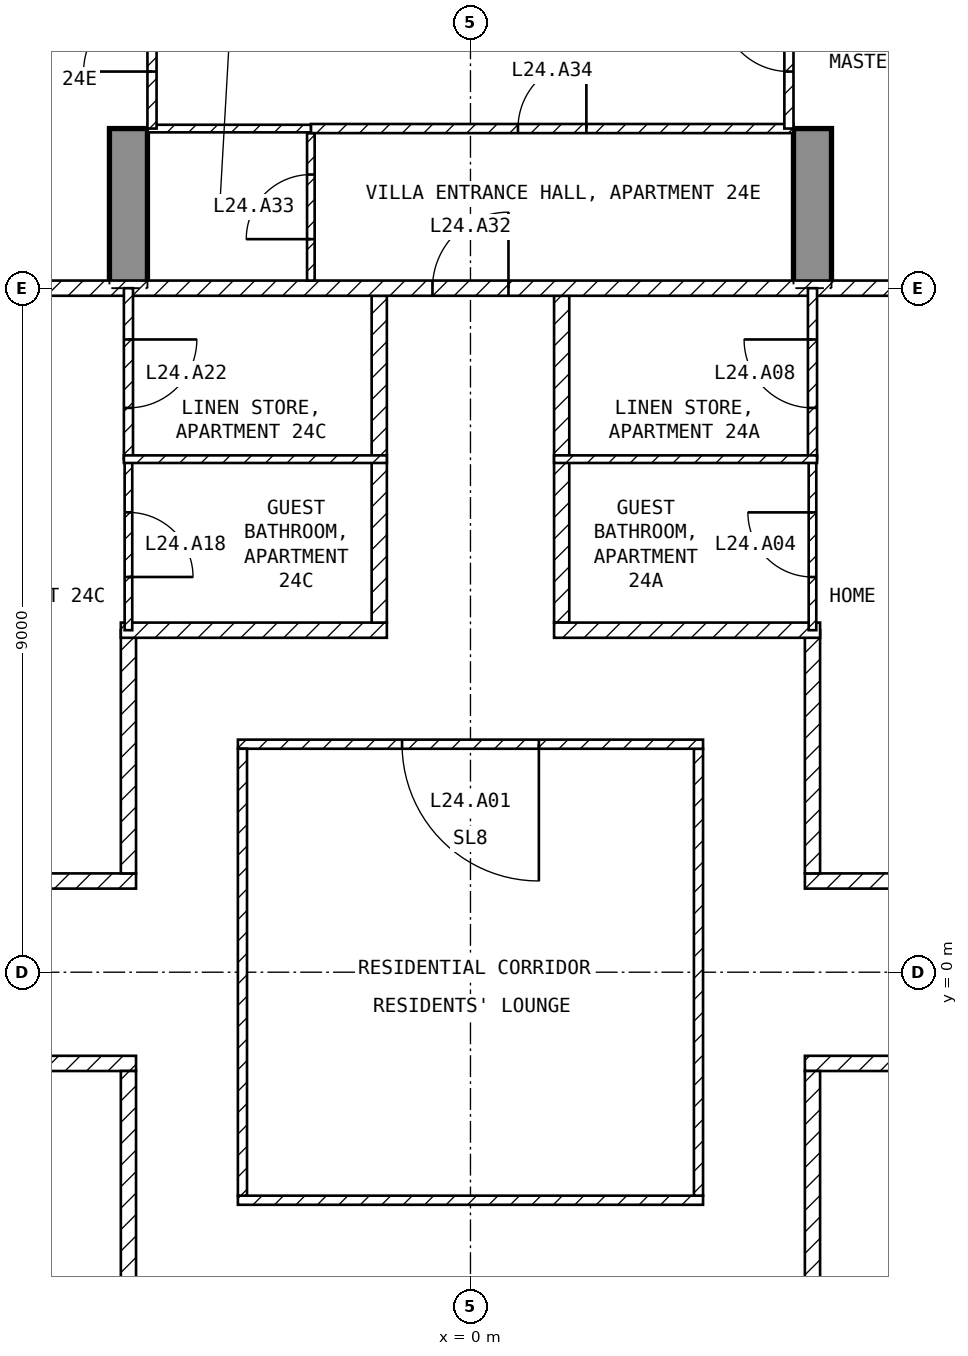
"""IFC4 building model, lengths in metres.
Left out: names, types, materials, properties, quantities, classifications, styles, units other than length and angle.
Written with IfcOpenShell. Run it as: python <this file> out.ifc"""

import sys

from ifc_helpers import new_model, si_unit, direction, frame, frame_2d, origin, place, context, subcontext, project, spatial, polyline, rectangle, outline, extrude, element, fill, save


model = new_model("IFC4")
c1 = context("Model", 3, precision=1e-05, world=origin(), true_north=direction((0.0, 1.0)))
c2 = subcontext(c1, "Body", "Model", "MODEL_VIEW")
j1 = project(units=[si_unit("LENGTHUNIT", "METRE"), si_unit("PLANEANGLEUNIT", "RADIAN")], contexts=[c1])
p1 = place(None, origin())
s1 = spatial("IfcSite", under=j1, at=p1, CompositionType="ELEMENT")
p2 = place(p1, origin())
s2 = spatial("IfcBuilding", under=s1, at=p2, CompositionType="ELEMENT")
p3 = place(p2, frame((0.0, 0.0, 105.9)))
s3 = spatial("IfcBuildingStorey", under=s2, at=p3, CompositionType="ELEMENT", Elevation=105.9)
for number, where, z_axis, x_axis in (
    (1, (-4.75, 9.0, -0.25), (1.0, 0.0, 0.0), (0.0, 1.0, 0.0)),
    (2, (4.25, 9.0, -0.25), (1.0, 0.0, 0.0), (0.0, 1.0, 0.0)),
):
    element("IfcWall", number, at=place(p3, frame(where, z_axis=z_axis, x_axis=x_axis)), inside=s3, PredefinedType="SHEAR", context=c2, shape_type="SweptSolid", body=[
        extrude(outline(polyline([(0.0, 0.0), (2.1, 0.0), (2.1, 2.65), (4.5, 2.65), (4.5, 0.0), (9.9, 0.0), (9.9, 2.65), (12.3, 2.65), (12.3, 0.0), (16.55, 0.0), (16.55, 3.5), (0.0, 3.5), (0.0, 0.0)])), origin(), (0.0, 0.0, 1.0), 0.5),
    ])
p4 = place(p3, frame((-3.06, -3.0, 0.0), z_axis=(0.0, 0.0, 1.0), x_axis=(1.0, 0.0, 0.0)))
e3 = element("IfcWall", 3, at=p4, inside=s3, PredefinedType="PARTITIONING", context=c2, shape_type="SweptSolid", body=[
    extrude(rectangle(XDim=6.12, YDim=0.12, at=frame_2d((3.06, 0.0))), origin(), (0.0, 0.0, 1.0), 3.25),
])
p5 = place(p3, frame((3.0, -2.94, 0.0), z_axis=(0.0, 0.0, 1.0), x_axis=(0.0, 1.0, 0.0)))
e4 = element("IfcWall", 4, at=p5, inside=s3, PredefinedType="PARTITIONING", context=c2, shape_type="SweptSolid", body=[
    extrude(rectangle(XDim=5.88, YDim=0.12, at=frame_2d((2.94, 0.0))), origin(), (0.0, 0.0, 1.0), 3.25),
])
p6 = place(p3, frame((3.06, 3.0, 0.0), z_axis=(0.0, 0.0, 1.0), x_axis=(-1.0, 0.0, 0.0)))
e5 = element("IfcWall", 5, at=p6, inside=s3, PredefinedType="PARTITIONING", context=c2, shape_type="SweptSolid", body=[
    extrude(rectangle(XDim=6.12, YDim=0.12, at=frame_2d((3.06, 0.0))), origin(), (0.0, 0.0, 1.0), 3.25),
])
p7 = place(p6, frame((2.16, 0.0, 0.0)))
e6 = element("IfcOpeningElement", 6, at=p7, cuts=e5, PredefinedType="OPENING", context=c2, shape_type="SweptSolid", body=[
    extrude(rectangle(XDim=1.8, YDim=2.1, at=frame_2d((0.9, 1.05))), frame((0.0, 0.07, 0.0), z_axis=(0.0, -1.0, 0.0), x_axis=(1.0, 0.0, 0.0)), (0.0, 0.0, 1.0), 0.14),
])
p8 = place(p3, frame((-3.0, 2.94, 0.0), z_axis=(0.0, 0.0, 1.0), x_axis=(0.0, -1.0, 0.0)))
e7 = element("IfcWall", 7, at=p8, inside=s3, PredefinedType="PARTITIONING", context=c2, shape_type="SweptSolid", body=[
    extrude(rectangle(XDim=5.88, YDim=0.12, at=frame_2d((2.94, 0.0))), origin(), (0.0, 0.0, 1.0), 3.25),
])
p9 = place(p3, frame((4.4, 1.2, 0.0), z_axis=(0.0, 0.0, 1.0), x_axis=(1.0, 0.0, 0.0)))
e8 = element("IfcWall", 8, at=p9, inside=s3, PredefinedType="PARTITIONING", context=c2, shape_type="SweptSolid", body=[
    extrude(rectangle(XDim=17.2, YDim=0.2, at=frame_2d((8.6, 0.0))), origin(), (0.0, 0.0, 1.0), 3.25),
])
p10 = place(p9, frame((5.9, 0.0, 0.0)))
e9 = element("IfcOpeningElement", 9, at=p10, cuts=e8, PredefinedType="OPENING", context=c2, shape_type="SweptSolid", body=[
    extrude(rectangle(XDim=1.0, YDim=2.1, at=frame_2d((0.5, 1.05))), frame((0.0, 0.11, 0.0), z_axis=(0.0, -1.0, 0.0), x_axis=(1.0, 0.0, 0.0)), (0.0, 0.0, 1.0), 0.22),
])
p11 = place(p3, frame((4.5, 4.5, 0.0), z_axis=(0.0, 0.0, 1.0), x_axis=(0.0, -1.0, 0.0)))
e10 = element("IfcWall", 10, at=p11, inside=s3, PredefinedType="PARTITIONING", context=c2, shape_type="SweptSolid", body=[
    extrude(rectangle(XDim=3.2, YDim=0.2, at=frame_2d((1.6, 0.0))), origin(), (0.0, 0.0, 1.0), 3.25),
])
p12 = place(p3, frame((1.2, 8.9, 0.0), z_axis=(0.0, 0.0, 1.0), x_axis=(0.0, -1.0, 0.0)))
e11 = element("IfcWall", 11, at=p12, inside=s3, PredefinedType="PARTITIONING", context=c2, shape_type="SweptSolid", body=[
    extrude(rectangle(XDim=4.3, YDim=0.2, at=frame_2d((2.15, 0.0))), origin(), (0.0, 0.0, 1.0), 3.25),
])
p13 = place(p3, frame((1.1, 4.5, 0.0), z_axis=(0.0, 0.0, 1.0), x_axis=(1.0, 0.0, 0.0)))
e12 = element("IfcWall", 12, at=p13, inside=s3, PredefinedType="PARTITIONING", context=c2, shape_type="SweptSolid", body=[
    extrude(rectangle(XDim=3.5, YDim=0.2, at=frame_2d((1.75, 0.0))), origin(), (0.0, 0.0, 1.0), 3.25),
])
p14 = place(p3, frame((21.6, -1.2, 0.0), z_axis=(0.0, 0.0, 1.0), x_axis=(-1.0, 0.0, 0.0)))
e13 = element("IfcWall", 13, at=p14, inside=s3, PredefinedType="PARTITIONING", context=c2, shape_type="SweptSolid", body=[
    extrude(rectangle(XDim=17.2, YDim=0.2, at=frame_2d((8.6, 0.0))), origin(), (0.0, 0.0, 1.0), 3.25),
])
p15 = place(p14, frame((3.85, 0.0, 0.0)))
e14 = element("IfcOpeningElement", 14, at=p15, cuts=e13, PredefinedType="OPENING", context=c2, shape_type="SweptSolid", body=[
    extrude(rectangle(XDim=1.0, YDim=2.1, at=frame_2d((0.5, 1.05))), frame((0.0, 0.11, 0.0), z_axis=(0.0, -1.0, 0.0), x_axis=(1.0, 0.0, 0.0)), (0.0, 0.0, 1.0), 0.22),
])
p16 = place(p3, frame((4.5, -1.3, 0.0), z_axis=(0.0, 0.0, 1.0), x_axis=(0.0, -1.0, 0.0)))
e15 = element("IfcWall", 15, at=p16, inside=s3, PredefinedType="PARTITIONING", context=c2, shape_type="SweptSolid", body=[
    extrude(rectangle(XDim=3.2, YDim=0.2, at=frame_2d((1.6, 0.0))), origin(), (0.0, 0.0, 1.0), 3.25),
])
p17 = place(p3, frame((-21.6, 1.2, 0.0), z_axis=(0.0, 0.0, 1.0), x_axis=(1.0, 0.0, 0.0)))
e16 = element("IfcWall", 16, at=p17, inside=s3, PredefinedType="PARTITIONING", context=c2, shape_type="SweptSolid", body=[
    extrude(rectangle(XDim=17.2, YDim=0.2, at=frame_2d((8.6, 0.0))), origin(), (0.0, 0.0, 1.0), 3.25),
])
p18 = place(p17, frame((6.1, 0.0, 0.0)))
e17 = element("IfcOpeningElement", 17, at=p18, cuts=e16, PredefinedType="OPENING", context=c2, shape_type="SweptSolid", body=[
    extrude(rectangle(XDim=1.0, YDim=2.1, at=frame_2d((0.5, 1.05))), frame((0.0, 0.11, 0.0), z_axis=(0.0, -1.0, 0.0), x_axis=(1.0, 0.0, 0.0)), (0.0, 0.0, 1.0), 0.22),
])
p19 = place(p3, frame((-4.5, 1.3, 0.0), z_axis=(0.0, 0.0, 1.0), x_axis=(0.0, 1.0, 0.0)))
e18 = element("IfcWall", 18, at=p19, inside=s3, PredefinedType="PARTITIONING", context=c2, shape_type="SweptSolid", body=[
    extrude(rectangle(XDim=3.2, YDim=0.2, at=frame_2d((1.6, 0.0))), origin(), (0.0, 0.0, 1.0), 3.25),
])
p20 = place(p3, frame((-4.6, 4.5, 0.0), z_axis=(0.0, 0.0, 1.0), x_axis=(1.0, 0.0, 0.0)))
e19 = element("IfcWall", 19, at=p20, inside=s3, PredefinedType="PARTITIONING", context=c2, shape_type="SweptSolid", body=[
    extrude(rectangle(XDim=3.5, YDim=0.2, at=frame_2d((1.75, 0.0))), origin(), (0.0, 0.0, 1.0), 3.25),
])
p21 = place(p3, frame((-1.2, 4.6, 0.0), z_axis=(0.0, 0.0, 1.0), x_axis=(0.0, 1.0, 0.0)))
e20 = element("IfcWall", 20, at=p21, inside=s3, PredefinedType="PARTITIONING", context=c2, shape_type="SweptSolid", body=[
    extrude(rectangle(XDim=4.3, YDim=0.2, at=frame_2d((2.15, 0.0))), origin(), (0.0, 0.0, 1.0), 3.25),
])
p22 = place(p3, frame((-4.4, -1.2, 0.0), z_axis=(0.0, 0.0, 1.0), x_axis=(-1.0, 0.0, 0.0)))
e21 = element("IfcWall", 21, at=p22, inside=s3, PredefinedType="PARTITIONING", context=c2, shape_type="SweptSolid", body=[
    extrude(rectangle(XDim=17.2, YDim=0.2, at=frame_2d((8.6, 0.0))), origin(), (0.0, 0.0, 1.0), 3.25),
])
p23 = place(p22, frame((8.3, 0.0, 0.0)))
e22 = element("IfcOpeningElement", 22, at=p23, cuts=e21, PredefinedType="OPENING", context=c2, shape_type="SweptSolid", body=[
    extrude(rectangle(XDim=1.0, YDim=2.1, at=frame_2d((0.5, 1.05))), frame((0.0, 0.11, 0.0), z_axis=(0.0, -1.0, 0.0), x_axis=(1.0, 0.0, 0.0)), (0.0, 0.0, 1.0), 0.22),
])
p24 = place(p3, frame((-4.5, -4.5, 0.0), z_axis=(0.0, 0.0, 1.0), x_axis=(0.0, 1.0, 0.0)))
e23 = element("IfcWall", 23, at=p24, inside=s3, PredefinedType="PARTITIONING", context=c2, shape_type="SweptSolid", body=[
    extrude(rectangle(XDim=3.2, YDim=0.2, at=frame_2d((1.6, 0.0))), origin(), (0.0, 0.0, 1.0), 3.25),
])
p25 = place(p3, frame((-8.92, 9.0, 0.0), z_axis=(0.0, 0.0, 1.0), x_axis=(1.0, 0.0, 0.0)))
e24 = element("IfcWall", 24, at=p25, inside=s3, PredefinedType="PARTITIONING", context=c2, shape_type="SweptSolid", body=[
    extrude(rectangle(XDim=17.84, YDim=0.2, at=frame_2d((8.92, 0.0))), origin(), (0.0, 0.0, 1.0), 3.25),
])
p26 = place(p25, frame((8.42, 0.0, 0.0)))
e25 = element("IfcOpeningElement", 25, at=p26, cuts=e24, PredefinedType="OPENING", context=c2, shape_type="SweptSolid", body=[
    extrude(rectangle(XDim=1.0, YDim=2.1, at=frame_2d((0.5, 1.05))), frame((0.0, 0.11, 0.0), z_axis=(0.0, -1.0, 0.0), x_axis=(1.0, 0.0, 0.0)), (0.0, 0.0, 1.0), 0.22),
])
p27 = place(p3, frame((4.5, 4.5, 0.0), z_axis=(0.0, 0.0, 1.0), x_axis=(0.0, 1.0, 0.0)))
e26 = element("IfcWall", 26, at=p27, inside=s3, PredefinedType="PARTITIONING", context=c2, shape_type="SweptSolid", body=[
    extrude(rectangle(XDim=2.25, YDim=0.1, at=frame_2d((1.125, 0.0))), origin(), (0.0, 0.0, 1.0), 3.25),
])
p28 = place(p27, frame((0.7, 0.0, 0.0)))
e27 = element("IfcOpeningElement", 27, at=p28, cuts=e26, PredefinedType="OPENING", context=c2, shape_type="SweptSolid", body=[
    extrude(rectangle(XDim=0.85, YDim=2.1, at=frame_2d((0.425, 1.05))), frame((0.0, 0.06, 0.0), z_axis=(0.0, -1.0, 0.0), x_axis=(1.0, 0.0, 0.0)), (0.0, 0.0, 1.0), 0.12),
])
p29 = place(p3, frame((4.5, 6.75, 0.0), z_axis=(0.0, 0.0, 1.0), x_axis=(0.0, 1.0, 0.0)))
e28 = element("IfcWall", 28, at=p29, inside=s3, PredefinedType="PARTITIONING", context=c2, shape_type="SweptSolid", body=[
    extrude(rectangle(XDim=2.25, YDim=0.12, at=frame_2d((1.125, 0.0))), origin(), (0.0, 0.0, 1.0), 3.25),
])
p30 = place(p29, frame((0.675, 0.0, 0.0)))
e29 = element("IfcOpeningElement", 29, at=p30, cuts=e28, PredefinedType="OPENING", context=c2, shape_type="SweptSolid", body=[
    extrude(rectangle(XDim=0.9, YDim=2.1, at=frame_2d((0.45, 1.05))), frame((0.0, 0.07, 0.0), z_axis=(0.0, -1.0, 0.0), x_axis=(1.0, 0.0, 0.0)), (0.0, 0.0, 1.0), 0.14),
])
p31 = place(p3, frame((1.1, 6.75, 0.0), z_axis=(0.0, 0.0, 1.0), x_axis=(1.0, 0.0, 0.0)))
e30 = element("IfcWall", 30, at=p31, inside=s3, PredefinedType="PARTITIONING", context=c2, shape_type="SweptSolid", body=[
    extrude(rectangle(XDim=3.46, YDim=0.1, at=frame_2d((1.73, 0.0))), origin(), (0.0, 0.0, 1.0), 3.25),
])
p32 = place(p3, frame((-4.5, 6.75, 0.0), z_axis=(0.0, 0.0, 1.0), x_axis=(0.0, -1.0, 0.0)))
e31 = element("IfcWall", 31, at=p32, inside=s3, PredefinedType="PARTITIONING", context=c2, shape_type="SweptSolid", body=[
    extrude(rectangle(XDim=2.25, YDim=0.1, at=frame_2d((1.125, 0.0))), origin(), (0.0, 0.0, 1.0), 3.25),
])
p33 = place(p32, frame((0.7, 0.0, 0.0)))
e32 = element("IfcOpeningElement", 32, at=p33, cuts=e31, PredefinedType="OPENING", context=c2, shape_type="SweptSolid", body=[
    extrude(rectangle(XDim=0.85, YDim=2.1, at=frame_2d((0.425, 1.05))), frame((0.0, 0.06, 0.0), z_axis=(0.0, -1.0, 0.0), x_axis=(1.0, 0.0, 0.0)), (0.0, 0.0, 1.0), 0.12),
])
p34 = place(p3, frame((-4.5, 9.0, 0.0), z_axis=(0.0, 0.0, 1.0), x_axis=(0.0, -1.0, 0.0)))
e33 = element("IfcWall", 33, at=p34, inside=s3, PredefinedType="PARTITIONING", context=c2, shape_type="SweptSolid", body=[
    extrude(rectangle(XDim=2.25, YDim=0.12, at=frame_2d((1.125, 0.0))), origin(), (0.0, 0.0, 1.0), 3.25),
])
p35 = place(p34, frame((0.675, 0.0, 0.0)))
e34 = element("IfcOpeningElement", 34, at=p35, cuts=e33, PredefinedType="OPENING", context=c2, shape_type="SweptSolid", body=[
    extrude(rectangle(XDim=0.9, YDim=2.1, at=frame_2d((0.45, 1.05))), frame((0.0, 0.07, 0.0), z_axis=(0.0, -1.0, 0.0), x_axis=(1.0, 0.0, 0.0)), (0.0, 0.0, 1.0), 0.14),
])
p36 = place(p3, frame((-4.56, 6.75, 0.0), z_axis=(0.0, 0.0, 1.0), x_axis=(1.0, 0.0, 0.0)))
e35 = element("IfcWall", 35, at=p36, inside=s3, PredefinedType="PARTITIONING", context=c2, shape_type="SweptSolid", body=[
    extrude(rectangle(XDim=3.46, YDim=0.1, at=frame_2d((1.73, 0.0))), origin(), (0.0, 0.0, 1.0), 3.25),
])
p37 = place(p3, frame((-2.1, 9.1, 0.0), z_axis=(0.0, 0.0, 1.0), x_axis=(0.0, 1.0, 0.0)))
e36 = element("IfcWall", 36, at=p37, inside=s3, PredefinedType="PARTITIONING", context=c2, shape_type="SweptSolid", body=[
    extrude(rectangle(XDim=1.94, YDim=0.1, at=frame_2d((0.97, 0.0))), origin(), (0.0, 0.0, 1.0), 3.25),
])
p38 = place(p37, frame((0.545, 0.0, 0.0)))
e37 = element("IfcOpeningElement", 37, at=p38, cuts=e36, PredefinedType="OPENING", context=c2, shape_type="SweptSolid", body=[
    extrude(rectangle(XDim=0.85, YDim=2.1, at=frame_2d((0.425, 1.05))), frame((0.0, 0.06, 0.0), z_axis=(0.0, -1.0, 0.0), x_axis=(1.0, 0.0, 0.0)), (0.0, 0.0, 1.0), 0.12),
])
p39 = place(p3, frame((-2.1, 11.1, 0.0), z_axis=(0.0, 0.0, 1.0), x_axis=(1.0, 0.0, 0.0)))
e38 = element("IfcWall", 38, at=p39, inside=s3, PredefinedType="PARTITIONING", context=c2, shape_type="SweptSolid", body=[
    extrude(rectangle(XDim=6.35, YDim=0.12, at=frame_2d((3.175, 0.0))), origin(), (0.0, 0.0, 1.0), 3.25),
])
p40 = place(p39, frame((2.725, 0.0, 0.0)))
e39 = element("IfcOpeningElement", 39, at=p40, cuts=e38, PredefinedType="OPENING", context=c2, shape_type="SweptSolid", body=[
    extrude(rectangle(XDim=0.9, YDim=2.1, at=frame_2d((0.45, 1.05))), frame((0.0, 0.07, 0.0), z_axis=(0.0, -1.0, 0.0), x_axis=(1.0, 0.0, 0.0)), (0.0, 0.0, 1.0), 0.14),
])
p41 = place(p3, frame((-4.25, 11.1, 0.0), z_axis=(0.0, 0.0, 1.0), x_axis=(1.0, 0.0, 0.0)))
e40 = element("IfcWall", 40, at=p41, inside=s3, PredefinedType="PARTITIONING", context=c2, shape_type="SweptSolid", body=[
    extrude(rectangle(XDim=2.15, YDim=0.1, at=frame_2d((1.075, 0.0))), origin(), (0.0, 0.0, 1.0), 3.25),
])
p42 = place(p3, frame((4.19, 11.1, 0.0), z_axis=(0.0, 0.0, 1.0), x_axis=(0.0, 1.0, 0.0)))
e41 = element("IfcWall", 41, at=p42, inside=s3, PredefinedType="PARTITIONING", context=c2, shape_type="SweptSolid", body=[
    extrude(rectangle(XDim=2.4, YDim=0.12, at=frame_2d((1.2, 0.0))), origin(), (0.0, 0.0, 1.0), 2.4),
])
p43 = place(p42, frame((0.75, 0.0, 0.0)))
e42 = element("IfcOpeningElement", 42, at=p43, cuts=e41, PredefinedType="OPENING", context=c2, shape_type="SweptSolid", body=[
    extrude(rectangle(XDim=0.9, YDim=2.1, at=frame_2d((0.45, 1.05))), frame((0.0, 0.07, 0.0), z_axis=(0.0, -1.0, 0.0), x_axis=(1.0, 0.0, 0.0)), (0.0, 0.0, 1.0), 0.14),
])
p44 = place(p3, frame((-4.19, 11.1, 0.0), z_axis=(0.0, 0.0, 1.0), x_axis=(0.0, 1.0, 0.0)))
e43 = element("IfcWall", 43, at=p44, inside=s3, PredefinedType="PARTITIONING", context=c2, shape_type="SweptSolid", body=[
    extrude(rectangle(XDim=2.4, YDim=0.12, at=frame_2d((1.2, 0.0))), origin(), (0.0, 0.0, 1.0), 2.4),
])
p45 = place(p44, frame((0.75, 0.0, 0.0)))
e44 = element("IfcOpeningElement", 44, at=p45, cuts=e43, PredefinedType="OPENING", context=c2, shape_type="SweptSolid", body=[
    extrude(rectangle(XDim=0.9, YDim=2.1, at=frame_2d((0.45, 1.05))), frame((0.0, 0.07, 0.0), z_axis=(0.0, -1.0, 0.0), x_axis=(1.0, 0.0, 0.0)), (0.0, 0.0, 1.0), 0.14),
])
p46 = place(p7, origin())
e45 = element("IfcDoor", 45, at=p46, inside=s3, OperationType="SINGLE_SWING_LEFT", PredefinedType="DOOR", context=c2, shape_type="SweptSolid", body=[
    extrude(rectangle(XDim=1.8, YDim=2.1, at=frame_2d((0.9, 1.05))), frame((0.0, 0.025, 0.0), z_axis=(0.0, -1.0, 0.0), x_axis=(1.0, 0.0, 0.0)), (0.0, 0.0, 1.0), 0.05),
])
fill(e6, e45)
p47 = place(p28, origin())
e46 = element("IfcDoor", 46, at=p47, inside=s3, OperationType="SINGLE_SWING_RIGHT", PredefinedType="DOOR", context=c2, shape_type="SweptSolid", body=[
    extrude(rectangle(XDim=0.85, YDim=2.1, at=frame_2d((0.425, 1.05))), frame((0.0, 0.025, 0.0), z_axis=(0.0, -1.0, 0.0), x_axis=(1.0, 0.0, 0.0)), (0.0, 0.0, 1.0), 0.05),
])
fill(e27, e46)
p48 = place(p30, origin())
e47 = element("IfcDoor", 47, at=p48, inside=s3, OperationType="SINGLE_SWING_RIGHT", PredefinedType="DOOR", context=c2, shape_type="SweptSolid", body=[
    extrude(rectangle(XDim=0.9, YDim=2.1, at=frame_2d((0.45, 1.05))), frame((0.0, 0.025, 0.0), z_axis=(0.0, -1.0, 0.0), x_axis=(1.0, 0.0, 0.0)), (0.0, 0.0, 1.0), 0.05),
])
fill(e29, e47)
p49 = place(p33, origin())
e48 = element("IfcDoor", 48, at=p49, inside=s3, OperationType="SINGLE_SWING_RIGHT", PredefinedType="DOOR", context=c2, shape_type="SweptSolid", body=[
    extrude(rectangle(XDim=0.85, YDim=2.1, at=frame_2d((0.425, 1.05))), frame((0.0, 0.025, 0.0), z_axis=(0.0, -1.0, 0.0), x_axis=(1.0, 0.0, 0.0)), (0.0, 0.0, 1.0), 0.05),
])
fill(e32, e48)
p50 = place(p35, origin())
e49 = element("IfcDoor", 49, at=p50, inside=s3, OperationType="SINGLE_SWING_LEFT", PredefinedType="DOOR", context=c2, shape_type="SweptSolid", body=[
    extrude(rectangle(XDim=0.9, YDim=2.1, at=frame_2d((0.45, 1.05))), frame((0.0, 0.025, 0.0), z_axis=(0.0, -1.0, 0.0), x_axis=(1.0, 0.0, 0.0)), (0.0, 0.0, 1.0), 0.05),
])
fill(e34, e49)
p51 = place(p26, origin())
e50 = element("IfcDoor", 50, at=p51, inside=s3, OperationType="SINGLE_SWING_RIGHT", PredefinedType="DOOR", context=c2, shape_type="SweptSolid", body=[
    extrude(rectangle(XDim=1.0, YDim=2.1, at=frame_2d((0.5, 1.05))), frame((0.0, 0.025, 0.0), z_axis=(0.0, -1.0, 0.0), x_axis=(1.0, 0.0, 0.0)), (0.0, 0.0, 1.0), 0.05),
])
fill(e25, e50)
p52 = place(p38, origin())
e51 = element("IfcDoor", 51, at=p52, inside=s3, OperationType="SINGLE_SWING_LEFT", PredefinedType="DOOR", context=c2, shape_type="SweptSolid", body=[
    extrude(rectangle(XDim=0.85, YDim=2.1, at=frame_2d((0.425, 1.05))), frame((0.0, 0.025, 0.0), z_axis=(0.0, -1.0, 0.0), x_axis=(1.0, 0.0, 0.0)), (0.0, 0.0, 1.0), 0.05),
])
fill(e37, e51)
p53 = place(p40, origin())
e52 = element("IfcDoor", 52, at=p53, inside=s3, OperationType="SINGLE_SWING_RIGHT", PredefinedType="DOOR", context=c2, shape_type="SweptSolid", body=[
    extrude(rectangle(XDim=0.9, YDim=2.1, at=frame_2d((0.45, 1.05))), frame((0.0, 0.025, 0.0), z_axis=(0.0, -1.0, 0.0), x_axis=(1.0, 0.0, 0.0)), (0.0, 0.0, 1.0), 0.05),
])
fill(e39, e52)
p54 = place(p43, origin())
e53 = element("IfcDoor", 53, at=p54, inside=s3, OperationType="SINGLE_SWING_RIGHT", PredefinedType="DOOR", context=c2, shape_type="SweptSolid", body=[
    extrude(rectangle(XDim=0.9, YDim=2.1, at=frame_2d((0.45, 1.05))), frame((0.0, 0.025, 0.0), z_axis=(0.0, -1.0, 0.0), x_axis=(1.0, 0.0, 0.0)), (0.0, 0.0, 1.0), 0.05),
])
fill(e42, e53)
p55 = place(p45, origin())
e54 = element("IfcDoor", 54, at=p55, inside=s3, OperationType="SINGLE_SWING_LEFT", PredefinedType="DOOR", context=c2, shape_type="SweptSolid", body=[
    extrude(rectangle(XDim=0.9, YDim=2.1, at=frame_2d((0.45, 1.05))), frame((0.0, 0.025, 0.0), z_axis=(0.0, -1.0, 0.0), x_axis=(1.0, 0.0, 0.0)), (0.0, 0.0, 1.0), 0.05),
])
fill(e44, e54)
save(model, sys.argv[1])
